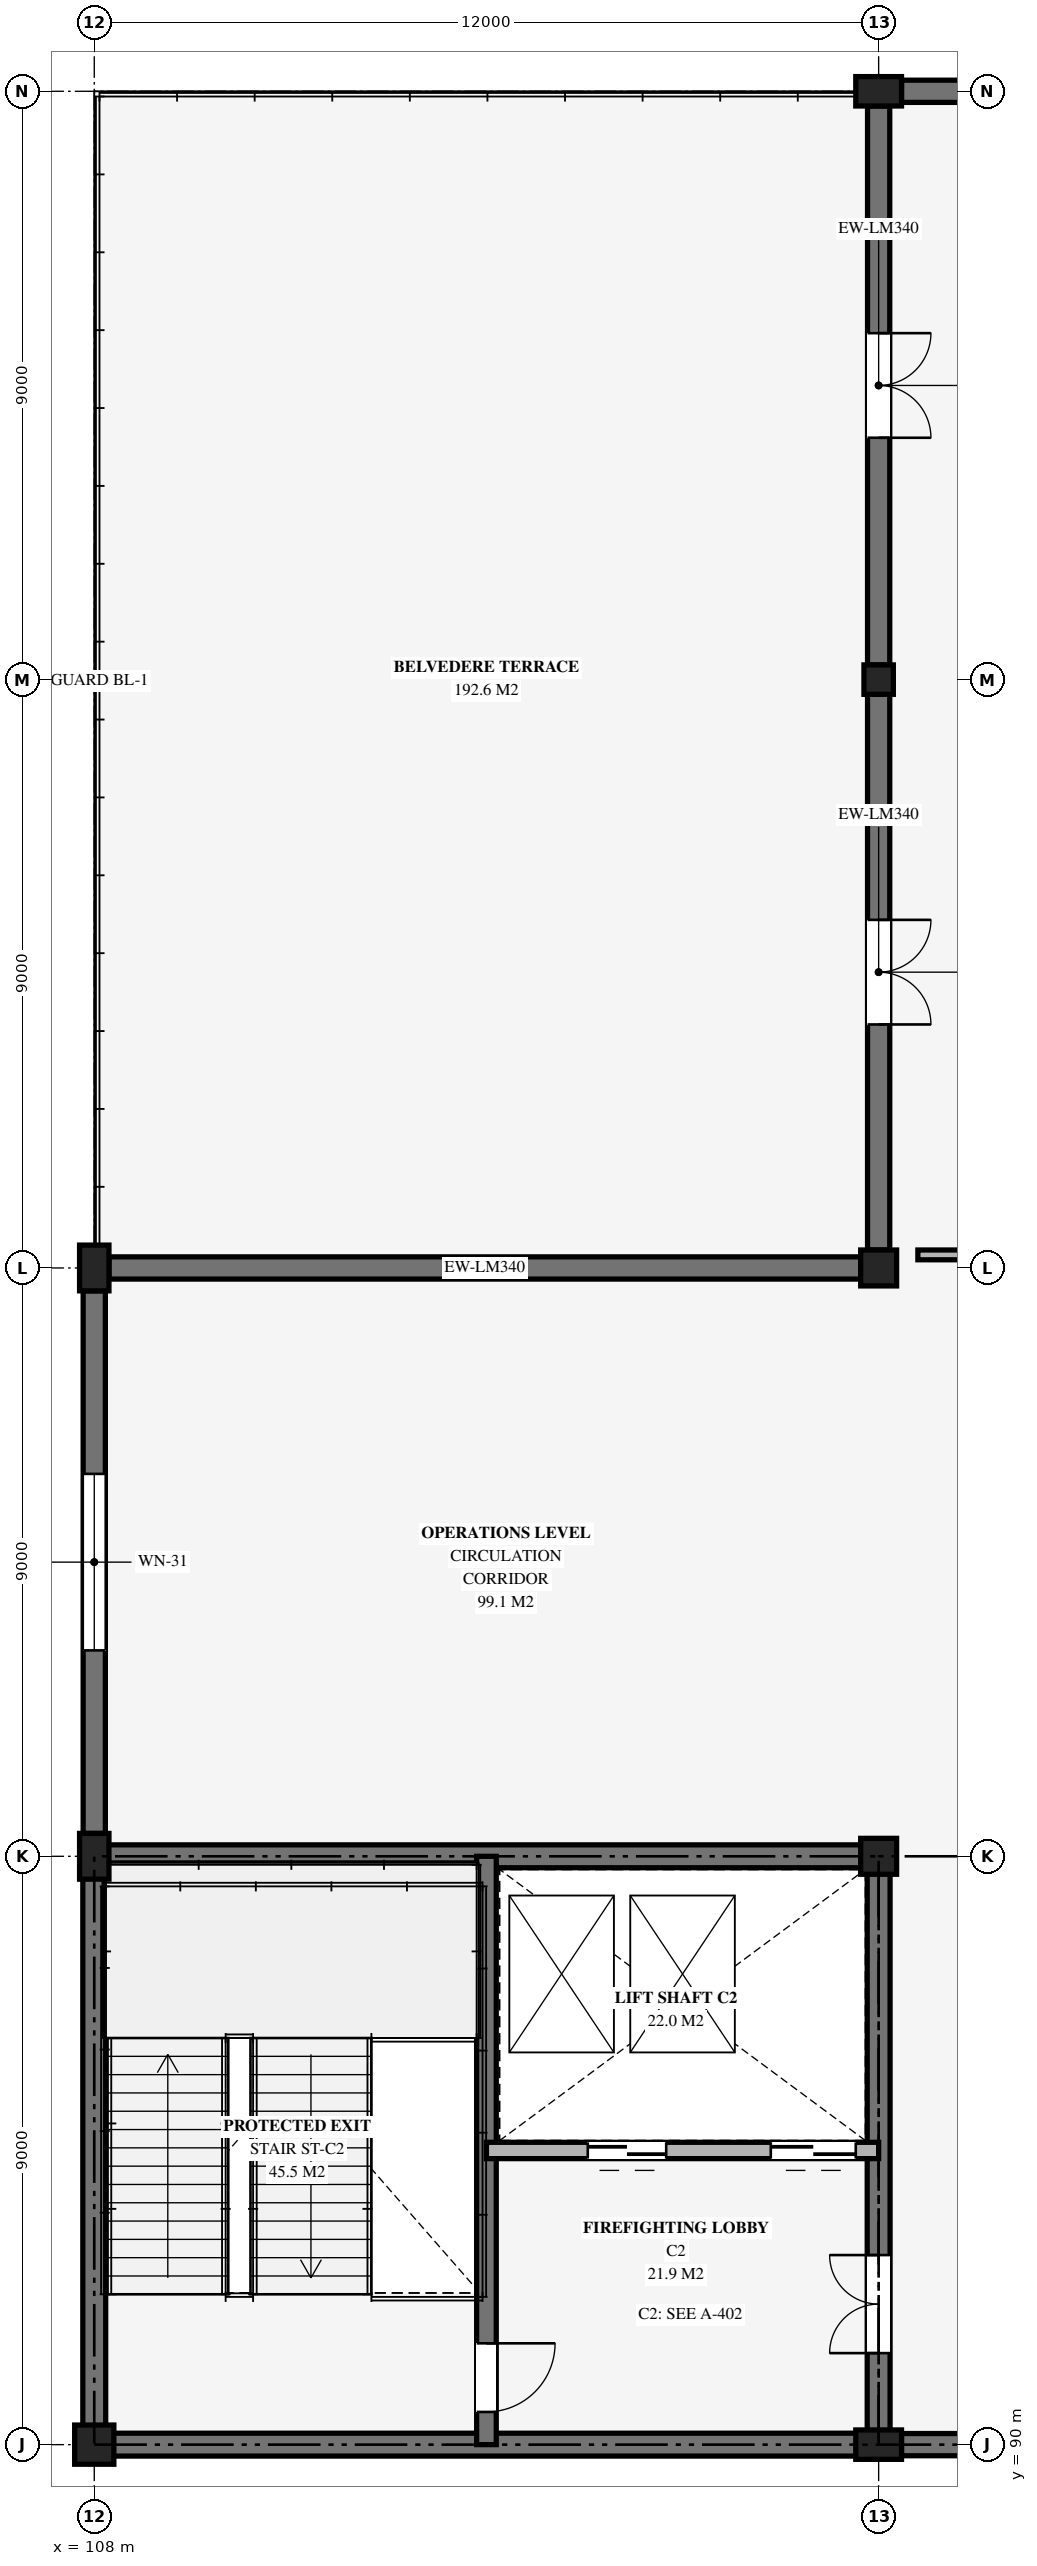
"""IFC4 building model, lengths in metres.
Left out: names, types, materials, properties, quantities, classifications, styles, units other than length and angle.
Written with IfcOpenShell. Run it as: python <this file> out.ifc"""

import sys

from ifc_helpers import new_model, si_unit, direction, frame, frame_2d, origin, origin_2d, place, context, subcontext, project, spatial, rectangle, circle, extrude, element, fill, save


model = new_model("IFC4")
c1 = context("Model", 3, precision=1e-05, world=origin(), true_north=direction((0.0, 1.0)))
c2 = subcontext(c1, "Body", "Model", "MODEL_VIEW")
j1 = project(units=[si_unit("LENGTHUNIT", "METRE"), si_unit("PLANEANGLEUNIT", "RADIAN")], contexts=[c1])
p1 = place(None, origin())
s1 = spatial("IfcSite", under=j1, at=p1, CompositionType="ELEMENT")
p2 = place(p1, origin())
s2 = spatial("IfcBuilding", under=s1, at=p2, CompositionType="ELEMENT")
p3 = place(p2, frame((0.0, 0.0, 19.5)))
s3 = spatial("IfcBuildingStorey", under=s2, at=p3, CompositionType="ELEMENT", Elevation=19.5)
p4 = place(p3, frame((108.0, 90.0, 0.0), z_axis=(0.0, 0.0, 1.0), x_axis=(1.0, 0.0, 0.0)))
e1 = element("IfcColumn", 1, at=p4, inside=s3, PredefinedType="COLUMN", context=c2, shape_type="SweptSolid", body=[
    extrude(circle(Radius=0.3, at=origin_2d()), origin(), (0.0, 0.0, 1.0), 4.04),
])
for number, where, z_axis, x_axis in (
    (2, (108.0, 99.0, 0.0), (0.0, 0.0, 1.0), (1.0, 0.0, 0.0)),
    (3, (108.0, 108.0, 0.0), (0.0, 0.0, 1.0), (1.0, 0.0, 0.0)),
    (4, (120.0, 90.0, 0.0), (0.0, 0.0, 1.0), (0.0, 1.0, 0.0)),
):
    element("IfcColumn", number, at=place(p3, frame(where, z_axis=z_axis, x_axis=x_axis)), inside=s3, PredefinedType="PILASTER", context=c2, shape_type="SweptSolid", body=[
        extrude(rectangle(XDim=0.45, YDim=0.7, at=origin_2d()), origin(), (0.0, 0.0, 1.0), 4.04),
    ])
for number, where, z_axis, x_axis in (
    (5, (120.0, 99.0, 0.0), (0.0, 0.0, 1.0), (1.0, 0.0, 0.0)),
    (6, (120.0, 108.0, 0.0), (0.0, 0.0, 1.0), (1.0, 0.0, 0.0)),
):
    element("IfcColumn", number, at=place(p3, frame(where, z_axis=z_axis, x_axis=x_axis)), inside=s3, PredefinedType="COLUMN", context=c2, shape_type="SweptSolid", body=[
        extrude(rectangle(XDim=0.55, YDim=0.55, at=origin_2d()), origin(), (0.0, 0.0, 1.0), 4.04),
    ])
p5 = place(p3, frame((120.0, 117.0, 0.0), z_axis=(0.0, 0.0, 1.0), x_axis=(1.0, 0.0, 0.0)))
e7 = element("IfcColumn", 7, at=p5, inside=s3, PredefinedType="COLUMN", context=c2, shape_type="SweptSolid", body=[
    extrude(rectangle(XDim=0.45, YDim=0.45, at=origin_2d()), origin(), (0.0, 0.0, 1.0), 4.04),
])
p6 = place(p3, frame((120.0, 126.0, 0.0), z_axis=(0.0, 0.0, 1.0), x_axis=(0.0, 1.0, 0.0)))
e8 = element("IfcColumn", 8, at=p6, inside=s3, PredefinedType="PILASTER", context=c2, shape_type="SweptSolid", body=[
    extrude(rectangle(XDim=0.45, YDim=0.7, at=origin_2d()), origin(), (0.0, 0.0, 1.0), 4.04),
])
p7 = place(p3, frame((131.5, 90.0, 0.0), z_axis=(0.0, 0.0, 1.0), x_axis=(-1.0, 0.0, 0.0)))
e9 = element("IfcWall", 9, at=p7, inside=s3, PredefinedType="SOLIDWALL", context=c2, shape_type="SweptSolid", body=[
    extrude(rectangle(XDim=11.15, YDim=0.34, at=frame_2d((5.575, 0.0))), origin(), (0.0, 0.0, 1.0), 3.94),
])
p8 = place(p7, frame((4.725, 0.0, 1.0)))
e10 = element("IfcOpeningElement", 10, at=p8, cuts=e9, PredefinedType="OPENING", context=c2, shape_type="SweptSolid", body=[
    extrude(rectangle(XDim=1.7, YDim=1.7, at=frame_2d((0.85, 0.85))), frame((0.0, 0.18, 0.0), z_axis=(0.0, -1.0, 0.0), x_axis=(1.0, 0.0, 0.0)), (0.0, 0.0, 1.0), 0.36),
])
p9 = place(p3, frame((108.0, 107.65, 0.0), z_axis=(0.0, 0.0, 1.0), x_axis=(0.0, -1.0, 0.0)))
e11 = element("IfcWall", 11, at=p9, inside=s3, PredefinedType="SOLIDWALL", context=c2, shape_type="SweptSolid", body=[
    extrude(rectangle(XDim=8.3, YDim=0.34, at=frame_2d((4.15, 0.0))), origin(), (0.0, 0.0, 1.0), 3.94),
])
p10 = place(p9, frame((2.8, 0.0, 1.0)))
e12 = element("IfcOpeningElement", 12, at=p10, cuts=e11, PredefinedType="OPENING", context=c2, shape_type="SweptSolid", body=[
    extrude(rectangle(XDim=2.7, YDim=1.9, at=frame_2d((1.35, 0.95))), frame((0.0, 0.18, 0.0), z_axis=(0.0, -1.0, 0.0), x_axis=(1.0, 0.0, 0.0)), (0.0, 0.0, 1.0), 0.36),
])
p11 = place(p3, frame((120.0, 116.775, 0.0), z_axis=(0.0, 0.0, 1.0), x_axis=(0.0, -1.0, 0.0)))
e13 = element("IfcWall", 13, at=p11, inside=s3, PredefinedType="SOLIDWALL", context=c2, shape_type="SweptSolid", body=[
    extrude(rectangle(XDim=8.5, YDim=0.34, at=frame_2d((4.25, 0.0))), origin(), (0.0, 0.0, 1.0), 3.94),
])
p12 = place(p11, frame((3.45, 0.0, 0.0)))
e14 = element("IfcOpeningElement", 14, at=p12, cuts=e13, PredefinedType="OPENING", context=c2, shape_type="SweptSolid", body=[
    extrude(rectangle(XDim=1.6, YDim=2.2, at=frame_2d((0.8, 1.1))), frame((0.0, 0.18, 0.0), z_axis=(0.0, -1.0, 0.0), x_axis=(1.0, 0.0, 0.0)), (0.0, 0.0, 1.0), 0.36),
])
p13 = place(p3, frame((120.0, 125.775, 0.0), z_axis=(0.0, 0.0, 1.0), x_axis=(0.0, -1.0, 0.0)))
e15 = element("IfcWall", 15, at=p13, inside=s3, PredefinedType="SOLIDWALL", context=c2, shape_type="SweptSolid", body=[
    extrude(rectangle(XDim=8.55, YDim=0.34, at=frame_2d((4.275, 0.0))), origin(), (0.0, 0.0, 1.0), 3.94),
])
p14 = place(p13, frame((3.475, 0.0, 0.0)))
e16 = element("IfcOpeningElement", 16, at=p14, cuts=e15, PredefinedType="OPENING", context=c2, shape_type="SweptSolid", body=[
    extrude(rectangle(XDim=1.6, YDim=2.2, at=frame_2d((0.8, 1.1))), frame((0.0, 0.18, 0.0), z_axis=(0.0, -1.0, 0.0), x_axis=(1.0, 0.0, 0.0)), (0.0, 0.0, 1.0), 0.36),
])
p15 = place(p3, frame((108.225, 108.0, 0.0), z_axis=(0.0, 0.0, 1.0), x_axis=(1.0, 0.0, 0.0)))
e17 = element("IfcWall", 17, at=p15, inside=s3, PredefinedType="SOLIDWALL", context=c2, shape_type="SweptSolid", body=[
    extrude(rectangle(XDim=11.5, YDim=0.34, at=frame_2d((5.75, 0.0))), origin(), (0.0, 0.0, 1.0), 3.94),
])
p16 = place(p3, frame((120.35, 126.0, 0.0), z_axis=(0.0, 0.0, 1.0), x_axis=(1.0, 0.0, 0.0)))
e18 = element("IfcWall", 18, at=p16, inside=s3, PredefinedType="SOLIDWALL", context=c2, shape_type="SweptSolid", body=[
    extrude(rectangle(XDim=11.3, YDim=0.34, at=frame_2d((5.65, 0.0))), origin(), (0.0, 0.0, 1.0), 3.94),
])
p17 = place(p16, frame((4.675, 0.0, 1.0)))
e19 = element("IfcOpeningElement", 19, at=p17, cuts=e18, PredefinedType="OPENING", context=c2, shape_type="SweptSolid", body=[
    extrude(rectangle(XDim=1.95, YDim=1.45, at=frame_2d((0.975, 0.725))), frame((0.0, 0.18, 0.0), z_axis=(0.0, -1.0, 0.0), x_axis=(1.0, 0.0, 0.0)), (0.0, 0.0, 1.0), 0.36),
])
for number, where, z_axis, x_axis in (
    (20, (108.0, 90.0, 0.0), (0.0, 0.0, 1.0), (1.0, 0.0, 0.0)),
    (21, (108.0, 99.0, 0.0), (0.0, 0.0, 1.0), (1.0, 0.0, 0.0)),
):
    element("IfcWall", number, at=place(p3, frame(where, z_axis=z_axis, x_axis=x_axis)), inside=s3, PredefinedType="SHEAR", context=c2, shape_type="SweptSolid", body=[
        extrude(rectangle(XDim=12.0, YDim=0.35, at=frame_2d((6.0, 0.0))), origin(), (0.0, 0.0, 1.0), 4.18),
    ])
p18 = place(p3, frame((108.0, 90.0, 0.0), z_axis=(0.0, 0.0, 1.0), x_axis=(0.0, 1.0, 0.0)))
e22 = element("IfcWall", 22, at=p18, inside=s3, PredefinedType="SHEAR", context=c2, shape_type="SweptSolid", body=[
    extrude(rectangle(XDim=9.0, YDim=0.35, at=frame_2d((4.5, 0.0))), origin(), (0.0, 0.0, 1.0), 4.18),
])
p19 = place(p3, frame((120.0, 90.0, 0.0), z_axis=(0.0, 0.0, 1.0), x_axis=(0.0, 1.0, 0.0)))
e23 = element("IfcWall", 23, at=p19, inside=s3, PredefinedType="SHEAR", context=c2, shape_type="SweptSolid", body=[
    extrude(rectangle(XDim=9.0, YDim=0.35, at=frame_2d((4.5, 0.0))), origin(), (0.0, 0.0, 1.0), 4.18),
])
p20 = place(p19, frame((1.4, 0.0, 0.0)))
e24 = element("IfcOpeningElement", 24, at=p20, cuts=e23, PredefinedType="OPENING", context=c2, shape_type="SweptSolid", body=[
    extrude(rectangle(XDim=1.5, YDim=2.2, at=frame_2d((0.75, 1.1))), frame((0.0, 0.185, 0.0), z_axis=(0.0, -1.0, 0.0), x_axis=(1.0, 0.0, 0.0)), (0.0, 0.0, 1.0), 0.37),
])
p21 = place(p3, frame((114.0, 99.0, 0.0), z_axis=(0.0, 0.0, 1.0), x_axis=(0.0, -1.0, 0.0)))
e25 = element("IfcWall", 25, at=p21, inside=s3, PredefinedType="SHEAR", context=c2, shape_type="SweptSolid", body=[
    extrude(rectangle(XDim=9.0, YDim=0.3, at=frame_2d((4.5, 0.0))), origin(), (0.0, 0.0, 1.0), 4.18),
])
p22 = place(p21, frame((7.45, 0.0, 0.0)))
e26 = element("IfcOpeningElement", 26, at=p22, cuts=e25, PredefinedType="OPENING", context=c2, shape_type="SweptSolid", body=[
    extrude(rectangle(XDim=1.05, YDim=2.15, at=frame_2d((0.525, 1.075))), frame((0.0, 0.16, 0.0), z_axis=(0.0, -1.0, 0.0), x_axis=(1.0, 0.0, 0.0)), (0.0, 0.0, 1.0), 0.32),
])
p23 = place(p3, frame((120.0, 94.5, 0.0), z_axis=(0.0, 0.0, 1.0), x_axis=(-1.0, 0.0, 0.0)))
e27 = element("IfcWall", 27, at=p23, inside=s3, PredefinedType="SOLIDWALL", context=c2, shape_type="SweptSolid", body=[
    extrude(rectangle(XDim=6.0, YDim=0.25, at=frame_2d((3.0, 0.0))), origin(), (0.0, 0.0, 1.0), 3.2),
])
p24 = place(p23, frame((0.35, 0.0, 0.0)))
e28 = element("IfcOpeningElement", 28, at=p24, cuts=e27, PredefinedType="OPENING", context=c2, shape_type="SweptSolid", body=[
    extrude(rectangle(XDim=1.3, YDim=2.25, at=frame_2d((0.65, 1.125))), frame((0.0, 0.135, 0.0), z_axis=(0.0, -1.0, 0.0), x_axis=(1.0, 0.0, 0.0)), (0.0, 0.0, 1.0), 0.27),
])
p25 = place(p23, frame((3.25, 0.0, 0.0)))
e29 = element("IfcOpeningElement", 29, at=p25, cuts=e27, PredefinedType="OPENING", context=c2, shape_type="SweptSolid", body=[
    extrude(rectangle(XDim=1.2, YDim=2.2, at=frame_2d((0.6, 1.1))), frame((0.0, 0.135, 0.0), z_axis=(0.0, -1.0, 0.0), x_axis=(1.0, 0.0, 0.0)), (0.0, 0.0, 1.0), 0.27),
])
p26 = place(p3, frame((120.6, 108.2, 0.0), z_axis=(0.0, 0.0, 1.0), x_axis=(1.0, 0.0, 0.0)))
e30 = element("IfcWall", 30, at=p26, inside=s3, PredefinedType="PARTITIONING", context=c2, shape_type="SweptSolid", body=[
    extrude(rectangle(XDim=35.0, YDim=0.15, at=frame_2d((17.5, 0.0))), origin(), (0.0, 0.0, 1.0), 3.2),
])
p27 = place(p26, frame((8.0, 0.0, 0.0)))
e31 = element("IfcOpeningElement", 31, at=p27, cuts=e30, PredefinedType="OPENING", context=c2, shape_type="SweptSolid", body=[
    extrude(rectangle(XDim=1.4, YDim=2.15, at=frame_2d((0.7, 1.075))), frame((0.0, 0.085, 0.0), z_axis=(0.0, -1.0, 0.0), x_axis=(1.0, 0.0, 0.0)), (0.0, 0.0, 1.0), 0.17),
])
p28 = place(p26, frame((29.0, 0.0, 0.0)))
e32 = element("IfcOpeningElement", 32, at=p28, cuts=e30, PredefinedType="OPENING", context=c2, shape_type="SweptSolid", body=[
    extrude(rectangle(XDim=1.0, YDim=2.15, at=frame_2d((0.5, 1.075))), frame((0.0, 0.085, 0.0), z_axis=(0.0, -1.0, 0.0), x_axis=(1.0, 0.0, 0.0)), (0.0, 0.0, 1.0), 0.17),
])
p29 = place(p10, origin())
e33 = element("IfcWindow", 33, at=p29, inside=s3, PartitioningType="SINGLE_PANEL", PredefinedType="WINDOW", context=c2, shape_type="SweptSolid", body=[
    extrude(rectangle(XDim=2.7, YDim=1.9, at=frame_2d((1.35, 0.95))), frame((0.0, 0.03, 0.0), z_axis=(0.0, -1.0, 0.0), x_axis=(1.0, 0.0, 0.0)), (0.0, 0.0, 1.0), 0.06),
])
fill(e12, e33)
p30 = place(p12, origin())
e34 = element("IfcDoor", 34, at=p30, inside=s3, OperationType="DOUBLE_DOOR_SINGLE_SWING", PredefinedType="DOOR", context=c2, shape_type="SweptSolid", body=[
    extrude(rectangle(XDim=1.6, YDim=2.2, at=frame_2d((0.8, 1.1))), frame((0.0, 0.025, 0.0), z_axis=(0.0, -1.0, 0.0), x_axis=(1.0, 0.0, 0.0)), (0.0, 0.0, 1.0), 0.05),
])
fill(e14, e34)
p31 = place(p14, origin())
e35 = element("IfcDoor", 35, at=p31, inside=s3, OperationType="DOUBLE_DOOR_SINGLE_SWING", PredefinedType="DOOR", context=c2, shape_type="SweptSolid", body=[
    extrude(rectangle(XDim=1.6, YDim=2.2, at=frame_2d((0.8, 1.1))), frame((0.0, 0.025, 0.0), z_axis=(0.0, -1.0, 0.0), x_axis=(1.0, 0.0, 0.0)), (0.0, 0.0, 1.0), 0.05),
])
fill(e16, e35)
p32 = place(p24, origin())
e36 = element("IfcDoor", 36, at=p32, inside=s3, OperationType="DOUBLE_DOOR_SLIDING", PredefinedType="USERDEFINED", context=c2, shape_type="SweptSolid", body=[
    extrude(rectangle(XDim=1.3, YDim=2.25, at=frame_2d((0.65, 1.125))), frame((0.0, 0.025, 0.0), z_axis=(0.0, -1.0, 0.0), x_axis=(1.0, 0.0, 0.0)), (0.0, 0.0, 1.0), 0.05),
])
fill(e28, e36)
p33 = place(p25, origin())
e37 = element("IfcDoor", 37, at=p33, inside=s3, OperationType="DOUBLE_DOOR_SLIDING", PredefinedType="USERDEFINED", context=c2, shape_type="SweptSolid", body=[
    extrude(rectangle(XDim=1.2, YDim=2.2, at=frame_2d((0.6, 1.1))), frame((0.0, 0.025, 0.0), z_axis=(0.0, -1.0, 0.0), x_axis=(1.0, 0.0, 0.0)), (0.0, 0.0, 1.0), 0.05),
])
fill(e29, e37)
p34 = place(p22, origin())
e38 = element("IfcDoor", 38, at=p34, inside=s3, OperationType="SINGLE_SWING_LEFT", PredefinedType="DOOR", context=c2, shape_type="SweptSolid", body=[
    extrude(rectangle(XDim=1.05, YDim=2.15, at=frame_2d((0.525, 1.075))), frame((0.0, 0.025, 0.0), z_axis=(0.0, -1.0, 0.0), x_axis=(1.0, 0.0, 0.0)), (0.0, 0.0, 1.0), 0.05),
])
fill(e26, e38)
p35 = place(p20, origin())
e39 = element("IfcDoor", 39, at=p35, inside=s3, OperationType="DOUBLE_DOOR_SINGLE_SWING", PredefinedType="DOOR", context=c2, shape_type="SweptSolid", body=[
    extrude(rectangle(XDim=1.5, YDim=2.2, at=frame_2d((0.75, 1.1))), frame((0.0, 0.025, 0.0), z_axis=(0.0, -1.0, 0.0), x_axis=(1.0, 0.0, 0.0)), (0.0, 0.0, 1.0), 0.05),
])
fill(e24, e39)
save(model, sys.argv[1])
